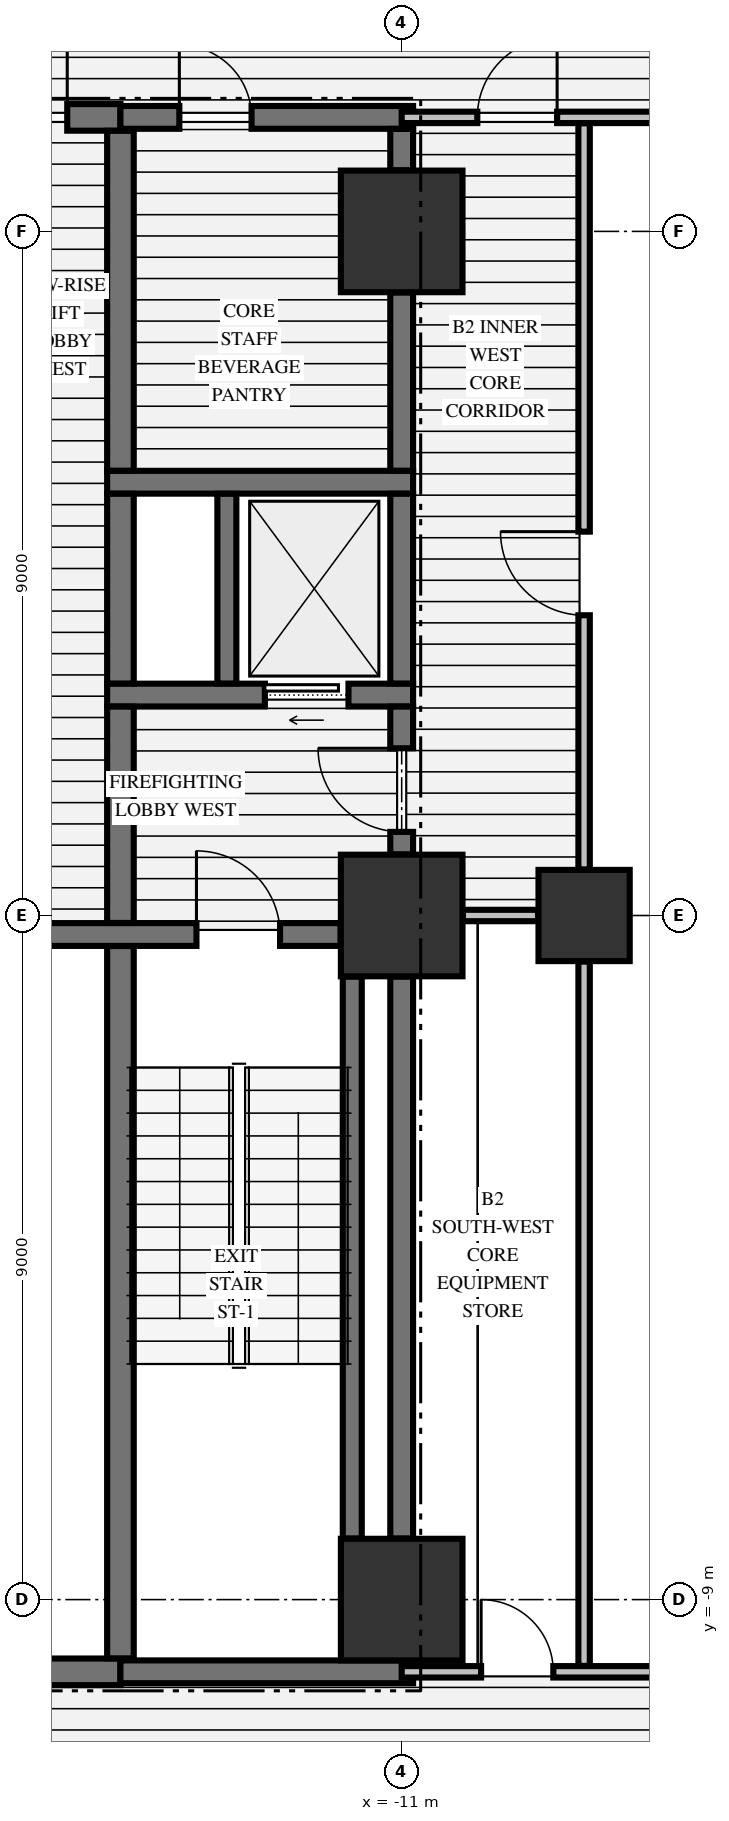
"""IFC4 building model, lengths in metres.
Left out: names, types, materials, properties, quantities, classifications, styles, units other than length and angle.
Written with IfcOpenShell. Run it as: python <this file> out.ifc"""

import sys

from ifc_helpers import new_model, si_unit, direction, frame, frame_2d, origin, origin_2d, place, context, subcontext, project, spatial, rectangle, extrude, element, fill, save


model = new_model("IFC4")
c1 = context("Model", 3, precision=1e-05, world=origin(), true_north=direction((0.0, 1.0)))
c2 = subcontext(c1, "Body", "Model", "MODEL_VIEW")
j1 = project(units=[si_unit("LENGTHUNIT", "METRE"), si_unit("PLANEANGLEUNIT", "RADIAN")], contexts=[c1])
p1 = place(None, origin())
s1 = spatial("IfcSite", under=j1, at=p1, CompositionType="ELEMENT")
p2 = place(p1, origin())
s2 = spatial("IfcBuilding", under=s1, at=p2, CompositionType="ELEMENT")
p3 = place(p2, frame((0.0, 0.0, -9.1)))
s3 = spatial("IfcBuildingStorey", under=s2, at=p3, CompositionType="ELEMENT", Elevation=-9.1)
for number, where, z_axis, x_axis in (
    (1, (-11.0, -9.0, -0.45), (0.0, 0.0, 1.0), (1.0, 0.0, 0.0)),
    (2, (-11.0, 0.0, -0.45), (0.0, 0.0, 1.0), (1.0, 0.0, 0.0)),
    (3, (-11.0, 9.0, -0.45), (0.0, 0.0, 1.0), (1.0, 0.0, 0.0)),
):
    element("IfcColumn", number, at=place(p3, frame(where, z_axis=z_axis, x_axis=x_axis)), inside=s3, PredefinedType="COLUMN", context=c2, shape_type="SweptSolid", body=[
        extrude(rectangle(XDim=1.6, YDim=1.6, at=origin_2d()), origin(), (0.0, 0.0, 1.0), 4.65),
    ])
p4 = place(p3, frame((-8.6, 0.0, -0.45), z_axis=(0.0, 0.0, 1.0), x_axis=(1.0, 0.0, 0.0)))
e4 = element("IfcColumn", 4, at=p4, inside=s3, PredefinedType="COLUMN", context=c2, shape_type="SweptSolid", body=[
    extrude(rectangle(XDim=1.2, YDim=1.2, at=origin_2d()), origin(), (0.0, 0.0, 1.0), 4.65),
])
p5 = place(p3, frame((-19.196, -9.95, 0.0), z_axis=(0.0, 0.0, 1.0), x_axis=(1.0, 0.0, 0.0)))
e5 = element("IfcWall", 5, at=p5, inside=s3, PredefinedType="SHEAR", context=c2, shape_type="SweptSolid", body=[
    extrude(rectangle(XDim=4.496, YDim=0.35, at=frame_2d((2.248, 0.0))), origin(), (0.0, 0.0, 1.0), 4.2),
])
p6 = place(p5, frame((0.371, 0.0, 0.0)))
e6 = element("IfcOpeningElement", 6, at=p6, cuts=e5, PredefinedType="OPENING", context=c2, shape_type="SweptSolid", body=[
    extrude(rectangle(XDim=1.05, YDim=2.15, at=frame_2d((0.525, 1.075))), frame((0.0, 0.185, 0.0), z_axis=(0.0, -1.0, 0.0), x_axis=(1.0, 0.0, 0.0)), (0.0, 0.0, 1.0), 0.37),
])
p7 = place(p3, frame((-14.7, -9.95, 0.0), z_axis=(0.0, 0.0, 1.0), x_axis=(1.0, 0.0, 0.0)))
e7 = element("IfcWall", 7, at=p7, inside=s3, PredefinedType="SHEAR", context=c2, shape_type="SweptSolid", body=[
    extrude(rectangle(XDim=3.85, YDim=0.3, at=frame_2d((1.925, 0.0))), origin(), (0.0, 0.0, 1.0), 4.2),
])
p8 = place(p3, frame((-19.196, -0.25, 0.0), z_axis=(0.0, 0.0, 1.0), x_axis=(1.0, 0.0, 0.0)))
e8 = element("IfcWall", 8, at=p8, inside=s3, PredefinedType="SHEAR", context=c2, shape_type="SweptSolid", body=[
    extrude(rectangle(XDim=7.392, YDim=0.3, at=frame_2d((3.696, 0.0))), origin(), (0.0, 0.0, 1.0), 4.2),
])
p9 = place(p8, frame((5.496, 0.0, 0.0)))
e9 = element("IfcOpeningElement", 9, at=p9, cuts=e8, PredefinedType="OPENING", context=c2, shape_type="SweptSolid", body=[
    extrude(rectangle(XDim=1.1, YDim=2.15, at=frame_2d((0.55, 1.075))), frame((0.0, 0.16, 0.0), z_axis=(0.0, -1.0, 0.0), x_axis=(1.0, 0.0, 0.0)), (0.0, 0.0, 1.0), 0.32),
])
p10 = place(p3, frame((-14.875, 2.9, 0.0), z_axis=(0.0, 0.0, 1.0), x_axis=(1.0, 0.0, 0.0)))
e10 = element("IfcWall", 10, at=p10, inside=s3, PredefinedType="SHEAR", context=c2, shape_type="SweptSolid", body=[
    extrude(rectangle(XDim=4.025, YDim=0.3, at=frame_2d((2.012, 0.0))), origin(), (0.0, 0.0, 1.0), 4.2),
])
p11 = place(p10, frame((2.075, 0.0, 0.0)))
e11 = element("IfcOpeningElement", 11, at=p11, cuts=e10, PredefinedType="OPENING", context=c2, shape_type="SweptSolid", body=[
    extrude(rectangle(XDim=1.1, YDim=2.2, at=frame_2d((0.55, 1.1))), frame((0.0, 0.16, 0.0), z_axis=(0.0, -1.0, 0.0), x_axis=(1.0, 0.0, 0.0)), (0.0, 0.0, 1.0), 0.32),
])
p12 = place(p3, frame((-14.875, 5.7, 0.0), z_axis=(0.0, 0.0, 1.0), x_axis=(1.0, 0.0, 0.0)))
e12 = element("IfcWall", 12, at=p12, inside=s3, PredefinedType="SHEAR", context=c2, shape_type="SweptSolid", body=[
    extrude(rectangle(XDim=4.025, YDim=0.3, at=frame_2d((2.012, 0.0))), origin(), (0.0, 0.0, 1.0), 4.2),
])
p13 = place(p3, frame((-20.175, 10.5, 0.0), z_axis=(0.0, 0.0, 1.0), x_axis=(1.0, 0.0, 0.0)))
e13 = element("IfcWall", 13, at=p13, inside=s3, PredefinedType="SHEAR", context=c2, shape_type="SweptSolid", body=[
    extrude(rectangle(XDim=5.475, YDim=0.35, at=frame_2d((2.738, 0.0))), origin(), (0.0, 0.0, 1.0), 4.2),
])
p14 = place(p13, frame((3.575, 0.0, 0.0)))
e14 = element("IfcOpeningElement", 14, at=p14, cuts=e13, PredefinedType="OPENING", context=c2, shape_type="SweptSolid", body=[
    extrude(rectangle(XDim=1.2, YDim=2.15, at=frame_2d((0.6, 1.075))), frame((0.0, 0.185, 0.0), z_axis=(0.0, -1.0, 0.0), x_axis=(1.0, 0.0, 0.0)), (0.0, 0.0, 1.0), 0.37),
])
p15 = place(p3, frame((-14.7, 10.5, 0.0), z_axis=(0.0, 0.0, 1.0), x_axis=(1.0, 0.0, 0.0)))
e15 = element("IfcWall", 15, at=p15, inside=s3, PredefinedType="SHEAR", context=c2, shape_type="SweptSolid", body=[
    extrude(rectangle(XDim=3.85, YDim=0.3, at=frame_2d((1.925, 0.0))), origin(), (0.0, 0.0, 1.0), 4.2),
])
p16 = place(p15, frame((0.775, 0.0, 0.0)))
e16 = element("IfcOpeningElement", 16, at=p16, cuts=e15, PredefinedType="OPENING", context=c2, shape_type="SweptSolid", body=[
    extrude(rectangle(XDim=0.95, YDim=2.15, at=frame_2d((0.475, 1.075))), frame((0.0, 0.16, 0.0), z_axis=(0.0, -1.0, 0.0), x_axis=(1.0, 0.0, 0.0)), (0.0, 0.0, 1.0), 0.32),
])
p17 = place(p3, frame((-11.0, -9.95, 0.0), z_axis=(0.0, 0.0, 1.0), x_axis=(1.0, 0.0, 0.0)))
e17 = element("IfcWall", 17, at=p17, inside=s3, PredefinedType="PARTITIONING", context=c2, shape_type="SweptSolid", body=[
    extrude(rectangle(XDim=22.0, YDim=0.15, at=frame_2d((11.0, 0.0))), origin(), (0.0, 0.0, 1.0), 4.2),
])
p18 = place(p17, frame((1.045, 0.0, 0.0)))
e18 = element("IfcOpeningElement", 18, at=p18, cuts=e17, PredefinedType="OPENING", context=c2, shape_type="SweptSolid", body=[
    extrude(rectangle(XDim=0.95, YDim=2.15, at=frame_2d((0.475, 1.075))), frame((0.0, 0.085, 0.0), z_axis=(0.0, -1.0, 0.0), x_axis=(1.0, 0.0, 0.0)), (0.0, 0.0, 1.0), 0.17),
])
p19 = place(p17, frame((20.005, 0.0, 0.0)))
e19 = element("IfcOpeningElement", 19, at=p19, cuts=e17, PredefinedType="OPENING", context=c2, shape_type="SweptSolid", body=[
    extrude(rectangle(XDim=0.95, YDim=2.15, at=frame_2d((0.475, 1.075))), frame((0.0, 0.085, 0.0), z_axis=(0.0, -1.0, 0.0), x_axis=(1.0, 0.0, 0.0)), (0.0, 0.0, 1.0), 0.17),
])
p20 = place(p3, frame((-10.194, 0.0, 0.0), z_axis=(0.0, 0.0, 1.0), x_axis=(1.0, 0.0, 0.0)))
e20 = element("IfcWall", 20, at=p20, inside=s3, PredefinedType="PARTITIONING", context=c2, shape_type="SweptSolid", body=[
    extrude(rectangle(XDim=0.988, YDim=0.15, at=frame_2d((0.494, 0.0))), origin(), (0.0, 0.0, 1.0), 3.242),
])
p21 = place(p3, frame((-11.0, 10.5, 0.0), z_axis=(0.0, 0.0, 1.0), x_axis=(1.0, 0.0, 0.0)))
e21 = element("IfcWall", 21, at=p21, inside=s3, PredefinedType="PARTITIONING", context=c2, shape_type="SweptSolid", body=[
    extrude(rectangle(XDim=22.0, YDim=0.15, at=frame_2d((11.0, 0.0))), origin(), (0.0, 0.0, 1.0), 4.2),
])
p22 = place(p21, frame((0.995, 0.0, 0.0)))
e22 = element("IfcOpeningElement", 22, at=p22, cuts=e21, PredefinedType="OPENING", context=c2, shape_type="SweptSolid", body=[
    extrude(rectangle(XDim=1.05, YDim=2.15, at=frame_2d((0.525, 1.075))), frame((0.0, 0.085, 0.0), z_axis=(0.0, -1.0, 0.0), x_axis=(1.0, 0.0, 0.0)), (0.0, 0.0, 1.0), 0.17),
])
p23 = place(p21, frame((19.955, 0.0, 0.0)))
e23 = element("IfcOpeningElement", 23, at=p23, cuts=e21, PredefinedType="OPENING", context=c2, shape_type="SweptSolid", body=[
    extrude(rectangle(XDim=1.05, YDim=2.15, at=frame_2d((0.525, 1.075))), frame((0.0, 0.085, 0.0), z_axis=(0.0, -1.0, 0.0), x_axis=(1.0, 0.0, 0.0)), (0.0, 0.0, 1.0), 0.17),
])
p24 = place(p3, frame((-14.7, -9.773, 0.0), z_axis=(0.0, 0.0, 1.0), x_axis=(0.0, 1.0, 0.0)))
e24 = element("IfcWall", 24, at=p24, inside=s3, PredefinedType="SHEAR", context=c2, shape_type="SweptSolid", body=[
    extrude(rectangle(XDim=9.371, YDim=0.35, at=frame_2d((4.686, 0.0))), origin(), (0.0, 0.0, 1.0), 4.2),
])
p25 = place(p3, frame((-14.7, -0.098, 0.0), z_axis=(0.0, 0.0, 1.0), x_axis=(0.0, 1.0, 0.0)))
e25 = element("IfcWall", 25, at=p25, inside=s3, PredefinedType="SHEAR", context=c2, shape_type="SweptSolid", body=[
    extrude(rectangle(XDim=2.846, YDim=0.35, at=frame_2d((1.423, 0.0))), origin(), (0.0, 0.0, 1.0), 4.2),
])
p26 = place(p3, frame((-14.7, 3.052, 0.0), z_axis=(0.0, 0.0, 1.0), x_axis=(0.0, 1.0, 0.0)))
e26 = element("IfcWall", 26, at=p26, inside=s3, PredefinedType="SHEAR", context=c2, shape_type="SweptSolid", body=[
    extrude(rectangle(XDim=2.496, YDim=0.35, at=frame_2d((1.248, 0.0))), origin(), (0.0, 0.0, 1.0), 4.2),
])
p27 = place(p3, frame((-14.7, 5.852, 0.0), z_axis=(0.0, 0.0, 1.0), x_axis=(0.0, 1.0, 0.0)))
e27 = element("IfcWall", 27, at=p27, inside=s3, PredefinedType="SHEAR", context=c2, shape_type="SweptSolid", body=[
    extrude(rectangle(XDim=4.471, YDim=0.35, at=frame_2d((2.235, 0.0))), origin(), (0.0, 0.0, 1.0), 4.2),
])
p28 = place(p3, frame((-13.3, 3.052, 0.0), z_axis=(0.0, 0.0, 1.0), x_axis=(0.0, 1.0, 0.0)))
e28 = element("IfcWall", 28, at=p28, inside=s3, PredefinedType="SOLIDWALL", context=c2, shape_type="SweptSolid", body=[
    extrude(rectangle(XDim=2.496, YDim=0.25, at=frame_2d((1.248, 0.0))), origin(), (0.0, 0.0, 1.0), 4.2),
])
p29 = place(p3, frame((-11.65, -8.196, 0.0), z_axis=(0.0, 0.0, 1.0), x_axis=(0.0, 1.0, 0.0)))
e29 = element("IfcWall", 29, at=p29, inside=s3, PredefinedType="SOLIDWALL", context=c2, shape_type="SweptSolid", body=[
    extrude(rectangle(XDim=7.392, YDim=0.25, at=frame_2d((3.696, 0.0))), origin(), (0.0, 0.0, 1.0), 4.2),
])
p30 = place(p3, frame((-11.0, -8.196, 0.0), z_axis=(0.0, 0.0, 1.0), x_axis=(0.0, 1.0, 0.0)))
e30 = element("IfcWall", 30, at=p30, inside=s3, PredefinedType="SHEAR", context=c2, shape_type="SweptSolid", body=[
    extrude(rectangle(XDim=7.392, YDim=0.3, at=frame_2d((3.696, 0.0))), origin(), (0.0, 0.0, 1.0), 4.2),
])
p31 = place(p3, frame((-11.0, 0.804, 0.0), z_axis=(0.0, 0.0, 1.0), x_axis=(0.0, 1.0, 0.0)))
e31 = element("IfcWall", 31, at=p31, inside=s3, PredefinedType="SHEAR", context=c2, shape_type="SweptSolid", body=[
    extrude(rectangle(XDim=1.944, YDim=0.3, at=frame_2d((0.972, 0.0))), origin(), (0.0, 0.0, 1.0), 4.2),
])
p32 = place(p31, frame((0.296, 0.0, 0.0)))
e32 = element("IfcOpeningElement", 32, at=p32, cuts=e31, PredefinedType="OPENING", context=c2, shape_type="SweptSolid", body=[
    extrude(rectangle(XDim=1.1, YDim=2.15, at=frame_2d((0.55, 1.075))), frame((0.0, 0.16, 0.0), z_axis=(0.0, -1.0, 0.0), x_axis=(1.0, 0.0, 0.0)), (0.0, 0.0, 1.0), 0.32),
])
p33 = place(p3, frame((-11.0, 3.052, 0.0), z_axis=(0.0, 0.0, 1.0), x_axis=(0.0, 1.0, 0.0)))
e33 = element("IfcWall", 33, at=p33, inside=s3, PredefinedType="SHEAR", context=c2, shape_type="SweptSolid", body=[
    extrude(rectangle(XDim=2.496, YDim=0.3, at=frame_2d((1.248, 0.0))), origin(), (0.0, 0.0, 1.0), 4.2),
])
p34 = place(p3, frame((-11.0, 5.852, 0.0), z_axis=(0.0, 0.0, 1.0), x_axis=(0.0, 1.0, 0.0)))
e34 = element("IfcWall", 34, at=p34, inside=s3, PredefinedType="SHEAR", context=c2, shape_type="SweptSolid", body=[
    extrude(rectangle(XDim=2.344, YDim=0.3, at=frame_2d((1.172, 0.0))), origin(), (0.0, 0.0, 1.0), 4.2),
])
p35 = place(p3, frame((-11.0, 9.804, 0.0), z_axis=(0.0, 0.0, 1.0), x_axis=(0.0, 1.0, 0.0)))
e35 = element("IfcWall", 35, at=p35, inside=s3, PredefinedType="SHEAR", context=c2, shape_type="SweptSolid", body=[
    extrude(rectangle(XDim=0.544, YDim=0.3, at=frame_2d((0.272, 0.0))), origin(), (0.0, 0.0, 1.0), 4.2),
])
p36 = place(p3, frame((-8.6, -9.872, 0.0), z_axis=(0.0, 0.0, 1.0), x_axis=(0.0, 1.0, 0.0)))
e36 = element("IfcWall", 36, at=p36, inside=s3, PredefinedType="PARTITIONING", context=c2, shape_type="SweptSolid", body=[
    extrude(rectangle(XDim=9.266, YDim=0.15, at=frame_2d((4.633, 0.0))), origin(), (0.0, 0.0, 1.0), 4.2),
])
p37 = place(p3, frame((-8.6, 0.606, 0.0), z_axis=(0.0, 0.0, 1.0), x_axis=(0.0, 1.0, 0.0)))
e37 = element("IfcWall", 37, at=p37, inside=s3, PredefinedType="PARTITIONING", context=c2, shape_type="SweptSolid", body=[
    extrude(rectangle(XDim=9.816, YDim=0.15, at=frame_2d((4.908, 0.0))), origin(), (0.0, 0.0, 1.0), 3.242),
])
p38 = place(p37, frame((3.344, 0.0, 0.0)))
e38 = element("IfcOpeningElement", 38, at=p38, cuts=e37, PredefinedType="OPENING", context=c2, shape_type="SweptSolid", body=[
    extrude(rectangle(XDim=1.1, YDim=2.15, at=frame_2d((0.55, 1.075))), frame((0.0, 0.085, 0.0), z_axis=(0.0, -1.0, 0.0), x_axis=(1.0, 0.0, 0.0)), (0.0, 0.0, 1.0), 0.17),
])
p39 = place(p9, origin())
e39 = element("IfcDoor", 39, at=p39, inside=s3, OperationType="SINGLE_SWING_LEFT", PredefinedType="DOOR", context=c2, shape_type="SweptSolid", body=[
    extrude(rectangle(XDim=1.1, YDim=2.15, at=frame_2d((0.55, 1.075))), frame((0.0, 0.025, 0.0), z_axis=(0.0, -1.0, 0.0), x_axis=(1.0, 0.0, 0.0)), (0.0, 0.0, 1.0), 0.05),
])
fill(e9, e39)
p40 = place(p32, origin())
e40 = element("IfcDoor", 40, at=p40, inside=s3, OperationType="SINGLE_SWING_RIGHT", PredefinedType="DOOR", context=c2, shape_type="SweptSolid", body=[
    extrude(rectangle(XDim=1.1, YDim=2.15, at=frame_2d((0.55, 1.075))), frame((0.0, 0.025, 0.0), z_axis=(0.0, -1.0, 0.0), x_axis=(1.0, 0.0, 0.0)), (0.0, 0.0, 1.0), 0.05),
])
fill(e32, e40)
p41 = place(p11, origin())
e41 = element("IfcDoor", 41, at=p41, inside=s3, OperationType="SLIDING_TO_LEFT", PredefinedType="DOOR", context=c2, shape_type="SweptSolid", body=[
    extrude(rectangle(XDim=1.1, YDim=2.2, at=frame_2d((0.55, 1.1))), frame((0.0, 0.025, 0.0), z_axis=(0.0, -1.0, 0.0), x_axis=(1.0, 0.0, 0.0)), (0.0, 0.0, 1.0), 0.05),
])
fill(e11, e41)
p42 = place(p16, origin())
e42 = element("IfcDoor", 42, at=p42, inside=s3, OperationType="SINGLE_SWING_LEFT", PredefinedType="DOOR", context=c2, shape_type="SweptSolid", body=[
    extrude(rectangle(XDim=0.95, YDim=2.15, at=frame_2d((0.475, 1.075))), frame((0.0, 0.025, 0.0), z_axis=(0.0, -1.0, 0.0), x_axis=(1.0, 0.0, 0.0)), (0.0, 0.0, 1.0), 0.05),
])
fill(e16, e42)
p43 = place(p14, origin())
e43 = element("IfcDoor", 43, at=p43, inside=s3, OperationType="SINGLE_SWING_RIGHT", PredefinedType="DOOR", context=c2, shape_type="SweptSolid", body=[
    extrude(rectangle(XDim=1.2, YDim=2.15, at=frame_2d((0.6, 1.075))), frame((0.0, 0.025, 0.0), z_axis=(0.0, -1.0, 0.0), x_axis=(1.0, 0.0, 0.0)), (0.0, 0.0, 1.0), 0.05),
])
fill(e14, e43)
p44 = place(p22, origin())
e44 = element("IfcDoor", 44, at=p44, inside=s3, OperationType="SINGLE_SWING_RIGHT", PredefinedType="DOOR", context=c2, shape_type="SweptSolid", body=[
    extrude(rectangle(XDim=1.05, YDim=2.15, at=frame_2d((0.525, 1.075))), frame((0.0, 0.025, 0.0), z_axis=(0.0, -1.0, 0.0), x_axis=(1.0, 0.0, 0.0)), (0.0, 0.0, 1.0), 0.05),
])
fill(e22, e44)
p45 = place(p18, origin())
e45 = element("IfcDoor", 45, at=p45, inside=s3, OperationType="SINGLE_SWING_LEFT", PredefinedType="DOOR", context=c2, shape_type="SweptSolid", body=[
    extrude(rectangle(XDim=0.95, YDim=2.15, at=frame_2d((0.475, 1.075))), frame((0.0, 0.025, 0.0), z_axis=(0.0, -1.0, 0.0), x_axis=(1.0, 0.0, 0.0)), (0.0, 0.0, 1.0), 0.05),
])
fill(e18, e45)
p46 = place(p38, origin())
e46 = element("IfcDoor", 46, at=p46, inside=s3, OperationType="SINGLE_SWING_RIGHT", PredefinedType="DOOR", context=c2, shape_type="SweptSolid", body=[
    extrude(rectangle(XDim=1.1, YDim=2.15, at=frame_2d((0.55, 1.075))), frame((0.0, 0.025, 0.0), z_axis=(0.0, -1.0, 0.0), x_axis=(1.0, 0.0, 0.0)), (0.0, 0.0, 1.0), 0.05),
])
fill(e38, e46)
save(model, sys.argv[1])
